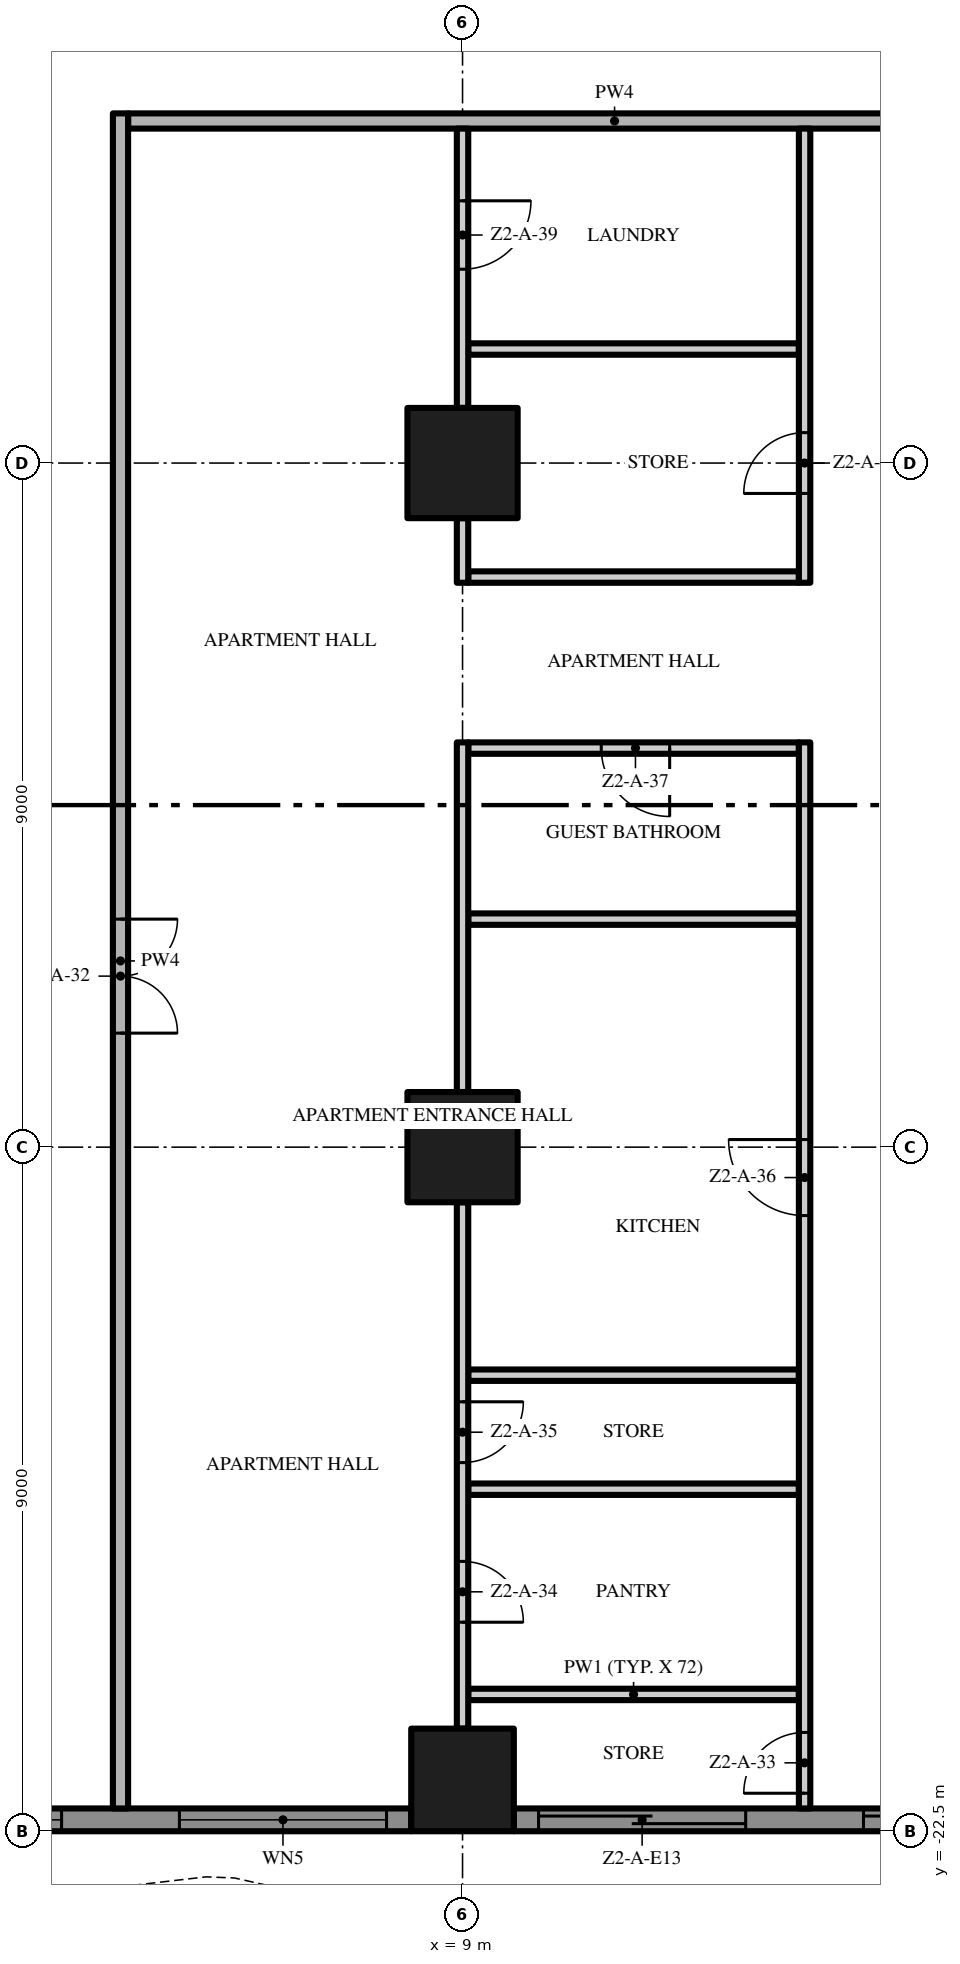
"""IFC4 building model, lengths in metres.
Left out: names, types, materials, properties, quantities, classifications, styles, units other than length and angle.
Written with IfcOpenShell. Run it as: python <this file> out.ifc"""

import sys

from ifc_helpers import new_model, si_unit, direction, frame, frame_2d, origin, origin_2d, place, context, subcontext, project, spatial, polyline, rectangle, outline, extrude, element, fill, save


model = new_model("IFC4")
c1 = context("Model", 3, precision=1e-05, world=origin(), true_north=direction((0.0, 1.0)))
c2 = subcontext(c1, "Body", "Model", "MODEL_VIEW")
j1 = project(units=[si_unit("LENGTHUNIT", "METRE"), si_unit("PLANEANGLEUNIT", "RADIAN")], contexts=[c1])
p1 = place(None, origin())
s1 = spatial("IfcSite", under=j1, at=p1, CompositionType="ELEMENT")
p2 = place(p1, origin())
s2 = spatial("IfcBuilding", under=s1, at=p2, CompositionType="ELEMENT")
p3 = place(p2, frame((0.0, 0.0, 73.2)))
s3 = spatial("IfcBuildingStorey", under=s2, at=p3, CompositionType="ELEMENT", Elevation=73.2)
p4 = place(p3, frame((9.0, -13.5, 0.0), z_axis=(0.0, 0.0, 1.0), x_axis=(1.0, 0.0, 0.0)))
e1 = element("IfcColumn", 1, at=p4, inside=s3, PredefinedType="COLUMN", context=c2, shape_type="SweptSolid", body=[
    extrude(rectangle(XDim=1.45, YDim=1.45, at=origin_2d()), origin(), (0.0, 0.0, 1.0), 3.5),
])
p5 = place(p3, frame((9.0, -21.825, 0.0), z_axis=(0.0, 0.0, 1.0), x_axis=(1.0, 0.0, 0.0)))
e2 = element("IfcColumn", 2, at=p5, inside=s3, PredefinedType="COLUMN", context=c2, shape_type="SweptSolid", body=[
    extrude(rectangle(XDim=1.35, YDim=1.35, at=origin_2d()), origin(), (0.0, 0.0, 1.0), 3.5),
])
p6 = place(p3, frame((9.0, -4.5, 0.0), z_axis=(0.0, 0.0, 1.0), x_axis=(1.0, 0.0, 0.0)))
e3 = element("IfcColumn", 3, at=p6, inside=s3, PredefinedType="COLUMN", context=c2, shape_type="SweptSolid", body=[
    extrude(rectangle(XDim=1.45, YDim=1.45, at=origin_2d()), origin(), (0.0, 0.0, 1.0), 3.5),
])
p7 = place(p3, frame((8.325, -22.35, 0.0), z_axis=(0.0, 0.0, 1.0), x_axis=(-1.0, 0.0, 0.0)))
e4 = element("IfcWall", 4, at=p7, inside=s3, PredefinedType="SOLIDWALL", context=c2, shape_type="SweptSolid", body=[
    extrude(rectangle(XDim=7.65, YDim=0.3, at=frame_2d((3.825, 0.0))), origin(), (0.0, 0.0, 1.0), 3.5),
])
p8 = place(p7, frame((4.6, 0.0, 0.45)))
e5 = element("IfcOpeningElement", 5, at=p8, cuts=e4, PredefinedType="OPENING", context=c2, shape_type="SweptSolid", body=[
    extrude(rectangle(XDim=2.725, YDim=2.65, at=frame_2d((1.363, 1.325))), frame((0.0, 0.16, 0.0), z_axis=(0.0, -1.0, 0.0), x_axis=(1.0, 0.0, 0.0)), (0.0, 0.0, 1.0), 0.32),
])
p9 = place(p7, frame((0.325, 0.0, 0.45)))
e6 = element("IfcOpeningElement", 6, at=p9, cuts=e4, PredefinedType="OPENING", context=c2, shape_type="SweptSolid", body=[
    extrude(rectangle(XDim=2.725, YDim=2.65, at=frame_2d((1.363, 1.325))), frame((0.0, 0.16, 0.0), z_axis=(0.0, -1.0, 0.0), x_axis=(1.0, 0.0, 0.0)), (0.0, 0.0, 1.0), 0.32),
])
p10 = place(p3, frame((17.325, -22.35, 0.0), z_axis=(0.0, 0.0, 1.0), x_axis=(-1.0, 0.0, 0.0)))
e7 = element("IfcWall", 7, at=p10, inside=s3, PredefinedType="SOLIDWALL", context=c2, shape_type="SweptSolid", body=[
    extrude(rectangle(XDim=7.65, YDim=0.3, at=frame_2d((3.825, 0.0))), origin(), (0.0, 0.0, 1.0), 3.5),
])
p11 = place(p10, frame((4.6, 0.0, 0.0)))
e8 = element("IfcOpeningElement", 8, at=p11, cuts=e7, PredefinedType="OPENING", context=c2, shape_type="SweptSolid", body=[
    extrude(rectangle(XDim=2.725, YDim=2.4, at=frame_2d((1.363, 1.2))), frame((0.0, 0.16, 0.0), z_axis=(0.0, -1.0, 0.0), x_axis=(1.0, 0.0, 0.0)), (0.0, 0.0, 1.0), 0.32),
])
p12 = place(p10, frame((0.325, 0.0, 0.0)))
e9 = element("IfcOpeningElement", 9, at=p12, cuts=e7, PredefinedType="OPENING", context=c2, shape_type="SweptSolid", body=[
    extrude(rectangle(XDim=2.725, YDim=2.4, at=frame_2d((1.363, 1.2))), frame((0.0, 0.16, 0.0), z_axis=(0.0, -1.0, 0.0), x_axis=(1.0, 0.0, 0.0)), (0.0, 0.0, 1.0), 0.32),
])
p13 = place(p3, origin())
e10 = element("IfcWall", 10, at=p13, inside=s3, PredefinedType="USERDEFINED", context=c2, shape_type="SweptSolid", body=[
    extrude(outline(polyline([(-22.5, -23.451), (-21.0, -24.112), (-19.5, -24.845), (-18.0, -25.369), (-16.875, -25.5), (-16.5, -25.485), (-15.0, -25.149), (-13.5, -24.488), (-12.0, -23.755), (-10.5, -23.231), (-9.375, -23.1), (-9.0, -23.115), (-7.5, -23.451), (-6.0, -24.112), (-4.5, -24.845), (-3.0, -25.369), (-1.875, -25.5), (-1.5, -25.485), (0.0, -25.149), (1.5, -24.488), (3.0, -23.755), (4.5, -23.231), (5.625, -23.1), (6.0, -23.115), (7.5, -23.451), (9.0, -24.112), (10.5, -24.845), (12.0, -25.369), (13.125, -25.5), (13.5, -25.485), (15.0, -25.149), (16.5, -24.488), (18.0, -23.755), (19.5, -23.231), (20.625, -23.1), (21.0, -23.115), (22.5, -23.451), (22.555, -23.208), (21.033, -22.866), (20.615, -22.849), (19.444, -22.986), (17.904, -23.524), (16.395, -24.261), (14.921, -24.91), (13.467, -25.236), (13.135, -25.249), (12.056, -25.124), (10.596, -24.614), (9.105, -23.885), (7.579, -23.213), (6.033, -22.866), (5.615, -22.849), (4.444, -22.986), (2.904, -23.524), (1.395, -24.261), (-0.079, -24.91), (-1.533, -25.236), (-1.865, -25.249), (-2.944, -25.124), (-4.404, -24.614), (-5.895, -23.885), (-7.421, -23.213), (-8.967, -22.866), (-9.385, -22.849), (-10.556, -22.986), (-12.096, -23.524), (-13.605, -24.261), (-15.079, -24.91), (-16.533, -25.236), (-16.865, -25.249), (-17.944, -25.124), (-19.404, -24.614), (-20.895, -23.885), (-22.399, -23.223), (-22.5, -23.451)])), origin(), (0.0, 0.0, 1.0), 0.9),
])
for number, where, z_axis, x_axis in (
    (11, (9.075, -20.7, 0.0), (0.0, 0.0, 1.0), (1.0, 0.0, 0.0)),
    (12, (9.075, -18.0, 0.0), (0.0, 0.0, 1.0), (1.0, 0.0, 0.0)),
    (13, (9.075, -16.5, 0.0), (0.0, 0.0, 1.0), (1.0, 0.0, 0.0)),
    (14, (9.075, -10.5, 0.0), (0.0, 0.0, 1.0), (1.0, 0.0, 0.0)),
):
    element("IfcWall", number, at=place(p3, frame(where, z_axis=z_axis, x_axis=x_axis)), inside=s3, PredefinedType="PARTITIONING", context=c2, shape_type="SweptSolid", body=[
        extrude(rectangle(XDim=4.35, YDim=0.15, at=frame_2d((2.175, 0.0))), origin(), (0.0, 0.0, 1.0), 3.5),
    ])
p14 = place(p3, frame((13.425, -8.25, 0.0), z_axis=(0.0, 0.0, 1.0), x_axis=(-1.0, 0.0, 0.0)))
e15 = element("IfcWall", 15, at=p14, inside=s3, PredefinedType="PARTITIONING", context=c2, shape_type="SweptSolid", body=[
    extrude(rectangle(XDim=4.35, YDim=0.15, at=frame_2d((2.175, 0.0))), origin(), (0.0, 0.0, 1.0), 3.5),
])
p15 = place(p14, frame((1.7, 0.0, 0.0)))
e16 = element("IfcOpeningElement", 16, at=p15, cuts=e15, PredefinedType="OPENING", context=c2, shape_type="SweptSolid", body=[
    extrude(rectangle(XDim=0.9, YDim=2.1, at=frame_2d((0.45, 1.05))), frame((0.0, 0.085, 0.0), z_axis=(0.0, -1.0, 0.0), x_axis=(1.0, 0.0, 0.0)), (0.0, 0.0, 1.0), 0.17),
])
for number, where, z_axis, x_axis in (
    (17, (9.075, -6.0, 0.0), (0.0, 0.0, 1.0), (1.0, 0.0, 0.0)),
    (18, (9.075, -3.0, 0.0), (0.0, 0.0, 1.0), (1.0, 0.0, 0.0)),
):
    element("IfcWall", number, at=place(p3, frame(where, z_axis=z_axis, x_axis=x_axis)), inside=s3, PredefinedType="PARTITIONING", context=c2, shape_type="SweptSolid", body=[
        extrude(rectangle(XDim=4.35, YDim=0.15, at=frame_2d((2.175, 0.0))), origin(), (0.0, 0.0, 1.0), 3.5),
    ])
p16 = place(p3, frame((4.6, 0.0, 0.0), z_axis=(0.0, 0.0, 1.0), x_axis=(1.0, 0.0, 0.0)))
e19 = element("IfcWall", 19, at=p16, inside=s3, PredefinedType="PARTITIONING", context=c2, shape_type="SweptSolid", body=[
    extrude(rectangle(XDim=12.8, YDim=0.2, at=frame_2d((6.4, 0.0))), origin(), (0.0, 0.0, 1.0), 3.5),
])
p17 = place(p3, frame((4.5, 0.1, 0.0), z_axis=(0.0, 0.0, 1.0), x_axis=(0.0, -1.0, 0.0)))
e20 = element("IfcWall", 20, at=p17, inside=s3, PredefinedType="PARTITIONING", context=c2, shape_type="SweptSolid", body=[
    extrude(rectangle(XDim=22.3, YDim=0.2, at=frame_2d((11.15, 0.0))), origin(), (0.0, 0.0, 1.0), 3.5),
])
p18 = place(p17, frame((10.6, 0.0, 0.0)))
e21 = element("IfcOpeningElement", 21, at=p18, cuts=e20, PredefinedType="OPENING", context=c2, shape_type="SweptSolid", body=[
    extrude(rectangle(XDim=1.5, YDim=2.4, at=frame_2d((0.75, 1.2))), frame((0.0, 0.11, 0.0), z_axis=(0.0, -1.0, 0.0), x_axis=(1.0, 0.0, 0.0)), (0.0, 0.0, 1.0), 0.22),
])
p19 = place(p3, frame((9.0, -14.225, 0.0), z_axis=(0.0, 0.0, 1.0), x_axis=(0.0, -1.0, 0.0)))
e22 = element("IfcWall", 22, at=p19, inside=s3, PredefinedType="PARTITIONING", context=c2, shape_type="SweptSolid", body=[
    extrude(rectangle(XDim=6.925, YDim=0.15, at=frame_2d((3.462, 0.0))), origin(), (0.0, 0.0, 1.0), 3.5),
])
p20 = place(p19, frame((4.725, 0.0, 0.0)))
e23 = element("IfcOpeningElement", 23, at=p20, cuts=e22, PredefinedType="OPENING", context=c2, shape_type="SweptSolid", body=[
    extrude(rectangle(XDim=0.8, YDim=2.0, at=frame_2d((0.4, 1.0))), frame((0.0, 0.085, 0.0), z_axis=(0.0, -1.0, 0.0), x_axis=(1.0, 0.0, 0.0)), (0.0, 0.0, 1.0), 0.17),
])
p21 = place(p19, frame((2.625, 0.0, 0.0)))
e24 = element("IfcOpeningElement", 24, at=p21, cuts=e22, PredefinedType="OPENING", context=c2, shape_type="SweptSolid", body=[
    extrude(rectangle(XDim=0.8, YDim=2.0, at=frame_2d((0.4, 1.0))), frame((0.0, 0.085, 0.0), z_axis=(0.0, -1.0, 0.0), x_axis=(1.0, 0.0, 0.0)), (0.0, 0.0, 1.0), 0.17),
])
p22 = place(p3, frame((9.0, -12.775, 0.0), z_axis=(0.0, 0.0, 1.0), x_axis=(0.0, 1.0, 0.0)))
e25 = element("IfcWall", 25, at=p22, inside=s3, PredefinedType="PARTITIONING", context=c2, shape_type="SweptSolid", body=[
    extrude(rectangle(XDim=4.6, YDim=0.15, at=frame_2d((2.3, 0.0))), origin(), (0.0, 0.0, 1.0), 3.5),
])
p23 = place(p3, frame((9.0, -6.075, 0.0), z_axis=(0.0, 0.0, 1.0), x_axis=(0.0, 1.0, 0.0)))
e26 = element("IfcWall", 26, at=p23, inside=s3, PredefinedType="PARTITIONING", context=c2, shape_type="SweptSolid", body=[
    extrude(rectangle(XDim=0.85, YDim=0.15, at=frame_2d((0.425, 0.0))), origin(), (0.0, 0.0, 1.0), 3.5),
])
p24 = place(p3, frame((9.0, -0.1, 0.0), z_axis=(0.0, 0.0, 1.0), x_axis=(0.0, -1.0, 0.0)))
e27 = element("IfcWall", 27, at=p24, inside=s3, PredefinedType="PARTITIONING", context=c2, shape_type="SweptSolid", body=[
    extrude(rectangle(XDim=3.675, YDim=0.15, at=frame_2d((1.837, 0.0))), origin(), (0.0, 0.0, 1.0), 3.5),
])
p25 = place(p24, frame((0.95, 0.0, 0.0)))
e28 = element("IfcOpeningElement", 28, at=p25, cuts=e27, PredefinedType="OPENING", context=c2, shape_type="SweptSolid", body=[
    extrude(rectangle(XDim=0.9, YDim=2.1, at=frame_2d((0.45, 1.05))), frame((0.0, 0.085, 0.0), z_axis=(0.0, -1.0, 0.0), x_axis=(1.0, 0.0, 0.0)), (0.0, 0.0, 1.0), 0.17),
])
p26 = place(p3, frame((13.5, -22.2, 0.0), z_axis=(0.0, 0.0, 1.0), x_axis=(0.0, 1.0, 0.0)))
e29 = element("IfcWall", 29, at=p26, inside=s3, PredefinedType="PARTITIONING", context=c2, shape_type="SweptSolid", body=[
    extrude(rectangle(XDim=14.025, YDim=0.15, at=frame_2d((7.013, 0.0))), origin(), (0.0, 0.0, 1.0), 3.5),
])
p27 = place(p26, frame((0.2, 0.0, 0.0)))
e30 = element("IfcOpeningElement", 30, at=p27, cuts=e29, PredefinedType="OPENING", context=c2, shape_type="SweptSolid", body=[
    extrude(rectangle(XDim=0.8, YDim=2.0, at=frame_2d((0.4, 1.0))), frame((0.0, 0.085, 0.0), z_axis=(0.0, -1.0, 0.0), x_axis=(1.0, 0.0, 0.0)), (0.0, 0.0, 1.0), 0.17),
])
p28 = place(p26, frame((7.8, 0.0, 0.0)))
e31 = element("IfcOpeningElement", 31, at=p28, cuts=e29, PredefinedType="OPENING", context=c2, shape_type="SweptSolid", body=[
    extrude(rectangle(XDim=1.0, YDim=2.4, at=frame_2d((0.5, 1.2))), frame((0.0, 0.085, 0.0), z_axis=(0.0, -1.0, 0.0), x_axis=(1.0, 0.0, 0.0)), (0.0, 0.0, 1.0), 0.17),
])
p29 = place(p3, frame((13.5, -6.075, 0.0), z_axis=(0.0, 0.0, 1.0), x_axis=(0.0, 1.0, 0.0)))
e32 = element("IfcWall", 32, at=p29, inside=s3, PredefinedType="PARTITIONING", context=c2, shape_type="SweptSolid", body=[
    extrude(rectangle(XDim=5.975, YDim=0.15, at=frame_2d((2.987, 0.0))), origin(), (0.0, 0.0, 1.0), 3.5),
])
p30 = place(p29, frame((1.175, 0.0, 0.0)))
e33 = element("IfcOpeningElement", 33, at=p30, cuts=e32, PredefinedType="OPENING", context=c2, shape_type="SweptSolid", body=[
    extrude(rectangle(XDim=0.8, YDim=2.0, at=frame_2d((0.4, 1.0))), frame((0.0, 0.085, 0.0), z_axis=(0.0, -1.0, 0.0), x_axis=(1.0, 0.0, 0.0)), (0.0, 0.0, 1.0), 0.17),
])
p31 = place(p8, origin())
e34 = element("IfcWindow", 34, at=p31, inside=s3, PartitioningType="SINGLE_PANEL", PredefinedType="WINDOW", context=c2, shape_type="SweptSolid", body=[
    extrude(rectangle(XDim=2.725, YDim=2.65, at=frame_2d((1.363, 1.325))), frame((0.0, 0.03, 0.0), z_axis=(0.0, -1.0, 0.0), x_axis=(1.0, 0.0, 0.0)), (0.0, 0.0, 1.0), 0.06),
])
fill(e5, e34)
p32 = place(p9, origin())
e35 = element("IfcWindow", 35, at=p32, inside=s3, PartitioningType="SINGLE_PANEL", PredefinedType="WINDOW", context=c2, shape_type="SweptSolid", body=[
    extrude(rectangle(XDim=2.725, YDim=2.65, at=frame_2d((1.363, 1.325))), frame((0.0, 0.03, 0.0), z_axis=(0.0, -1.0, 0.0), x_axis=(1.0, 0.0, 0.0)), (0.0, 0.0, 1.0), 0.06),
])
fill(e6, e35)
p33 = place(p11, origin())
e36 = element("IfcDoor", 36, at=p33, inside=s3, OperationType="SINGLE_SWING_LEFT", PredefinedType="DOOR", context=c2, shape_type="SweptSolid", body=[
    extrude(rectangle(XDim=2.725, YDim=2.4, at=frame_2d((1.363, 1.2))), frame((0.0, 0.025, 0.0), z_axis=(0.0, -1.0, 0.0), x_axis=(1.0, 0.0, 0.0)), (0.0, 0.0, 1.0), 0.05),
])
fill(e8, e36)
p34 = place(p12, origin())
e37 = element("IfcDoor", 37, at=p34, inside=s3, OperationType="SINGLE_SWING_LEFT", PredefinedType="DOOR", context=c2, shape_type="SweptSolid", body=[
    extrude(rectangle(XDim=2.725, YDim=2.4, at=frame_2d((1.363, 1.2))), frame((0.0, 0.025, 0.0), z_axis=(0.0, -1.0, 0.0), x_axis=(1.0, 0.0, 0.0)), (0.0, 0.0, 1.0), 0.05),
])
fill(e9, e37)
p35 = place(p18, origin())
e38 = element("IfcDoor", 38, at=p35, inside=s3, OperationType="DOUBLE_DOOR_SINGLE_SWING", PredefinedType="DOOR", context=c2, shape_type="SweptSolid", body=[
    extrude(rectangle(XDim=1.5, YDim=2.4, at=frame_2d((0.75, 1.2))), frame((0.0, 0.025, 0.0), z_axis=(0.0, -1.0, 0.0), x_axis=(1.0, 0.0, 0.0)), (0.0, 0.0, 1.0), 0.05),
])
fill(e21, e38)
p36 = place(p27, origin())
e39 = element("IfcDoor", 39, at=p36, inside=s3, OperationType="SINGLE_SWING_LEFT", PredefinedType="DOOR", context=c2, shape_type="SweptSolid", body=[
    extrude(rectangle(XDim=0.8, YDim=2.0, at=frame_2d((0.4, 1.0))), frame((0.0, 0.025, 0.0), z_axis=(0.0, -1.0, 0.0), x_axis=(1.0, 0.0, 0.0)), (0.0, 0.0, 1.0), 0.05),
])
fill(e30, e39)
p37 = place(p20, origin())
e40 = element("IfcDoor", 40, at=p37, inside=s3, OperationType="SINGLE_SWING_RIGHT", PredefinedType="DOOR", context=c2, shape_type="SweptSolid", body=[
    extrude(rectangle(XDim=0.8, YDim=2.0, at=frame_2d((0.4, 1.0))), frame((0.0, 0.025, 0.0), z_axis=(0.0, -1.0, 0.0), x_axis=(1.0, 0.0, 0.0)), (0.0, 0.0, 1.0), 0.05),
])
fill(e23, e40)
p38 = place(p21, origin())
e41 = element("IfcDoor", 41, at=p38, inside=s3, OperationType="SINGLE_SWING_LEFT", PredefinedType="DOOR", context=c2, shape_type="SweptSolid", body=[
    extrude(rectangle(XDim=0.8, YDim=2.0, at=frame_2d((0.4, 1.0))), frame((0.0, 0.025, 0.0), z_axis=(0.0, -1.0, 0.0), x_axis=(1.0, 0.0, 0.0)), (0.0, 0.0, 1.0), 0.05),
])
fill(e24, e41)
p39 = place(p28, origin())
e42 = element("IfcDoor", 42, at=p39, inside=s3, OperationType="SINGLE_SWING_RIGHT", PredefinedType="DOOR", context=c2, shape_type="SweptSolid", body=[
    extrude(rectangle(XDim=1.0, YDim=2.4, at=frame_2d((0.5, 1.2))), frame((0.0, 0.025, 0.0), z_axis=(0.0, -1.0, 0.0), x_axis=(1.0, 0.0, 0.0)), (0.0, 0.0, 1.0), 0.05),
])
fill(e31, e42)
p40 = place(p15, origin())
e43 = element("IfcDoor", 43, at=p40, inside=s3, OperationType="SINGLE_SWING_LEFT", PredefinedType="DOOR", context=c2, shape_type="SweptSolid", body=[
    extrude(rectangle(XDim=0.9, YDim=2.1, at=frame_2d((0.45, 1.05))), frame((0.0, 0.025, 0.0), z_axis=(0.0, -1.0, 0.0), x_axis=(1.0, 0.0, 0.0)), (0.0, 0.0, 1.0), 0.05),
])
fill(e16, e43)
p41 = place(p30, origin())
e44 = element("IfcDoor", 44, at=p41, inside=s3, OperationType="SINGLE_SWING_LEFT", PredefinedType="DOOR", context=c2, shape_type="SweptSolid", body=[
    extrude(rectangle(XDim=0.8, YDim=2.0, at=frame_2d((0.4, 1.0))), frame((0.0, 0.025, 0.0), z_axis=(0.0, -1.0, 0.0), x_axis=(1.0, 0.0, 0.0)), (0.0, 0.0, 1.0), 0.05),
])
fill(e33, e44)
p42 = place(p25, origin())
e45 = element("IfcDoor", 45, at=p42, inside=s3, OperationType="SINGLE_SWING_LEFT", PredefinedType="DOOR", context=c2, shape_type="SweptSolid", body=[
    extrude(rectangle(XDim=0.9, YDim=2.1, at=frame_2d((0.45, 1.05))), frame((0.0, 0.025, 0.0), z_axis=(0.0, -1.0, 0.0), x_axis=(1.0, 0.0, 0.0)), (0.0, 0.0, 1.0), 0.05),
])
fill(e28, e45)
save(model, sys.argv[1])
